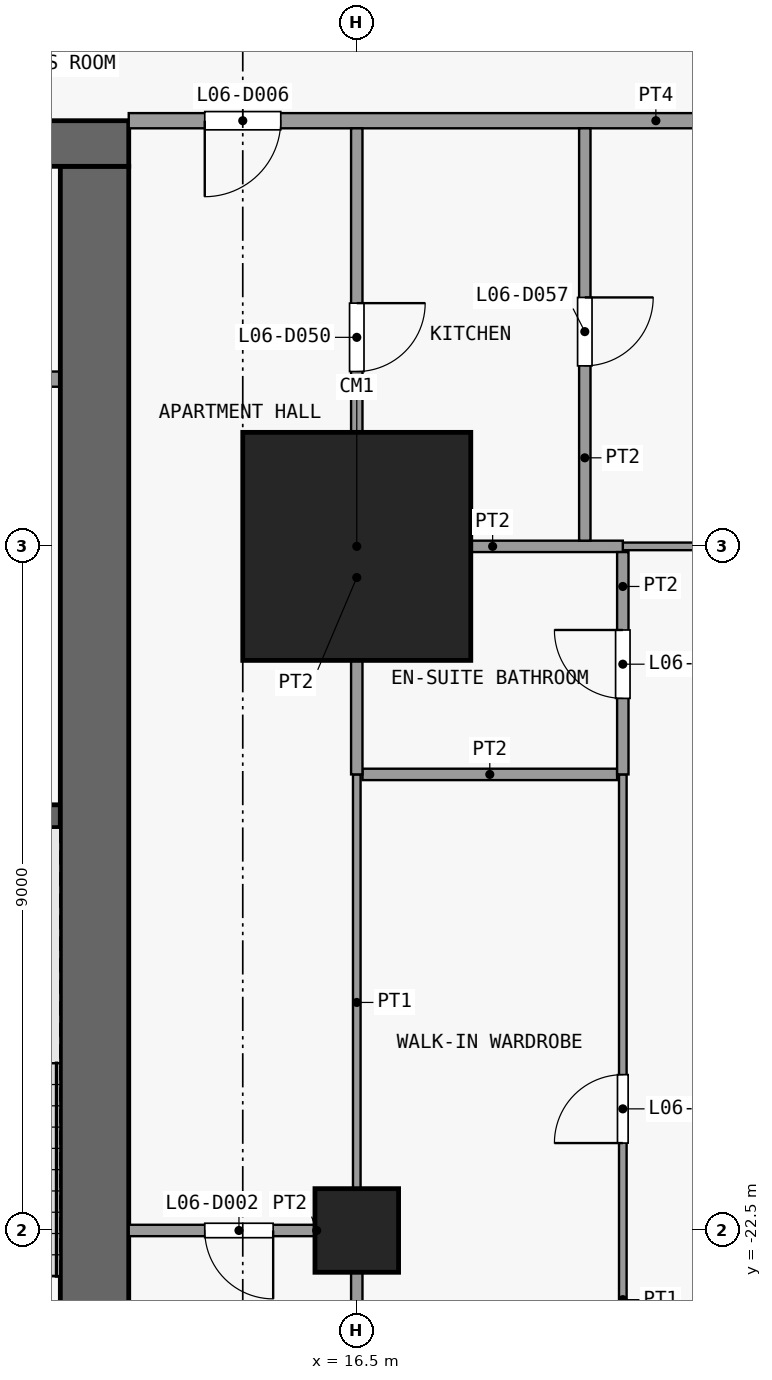
"""IFC4 building model, lengths in metres.
Left out: names, types, materials, properties, quantities, classifications, styles, units other than length and angle.
Written with IfcOpenShell. Run it as: python <this file> out.ifc"""

import sys

from ifc_helpers import new_model, si_unit, direction, frame, frame_2d, origin, origin_2d, place, context, subcontext, project, spatial, rectangle, extrude, element, fill, save


model = new_model("IFC4")
c1 = context("Model", 3, precision=1e-05, world=origin(), true_north=direction((0.0, 1.0)))
c2 = subcontext(c1, "Body", "Model", "MODEL_VIEW")
j1 = project(units=[si_unit("LENGTHUNIT", "METRE"), si_unit("PLANEANGLEUNIT", "RADIAN")], contexts=[c1])
p1 = place(None, origin())
s1 = spatial("IfcSite", under=j1, at=p1, CompositionType="ELEMENT")
p2 = place(p1, origin())
s2 = spatial("IfcBuilding", under=s1, at=p2, CompositionType="ELEMENT")
p3 = place(p2, frame((0.0, 0.0, 32.5)))
s3 = spatial("IfcBuildingStorey", under=s2, at=p3, CompositionType="ELEMENT", Elevation=32.5)
p4 = place(p3, frame((16.5, -22.5, 0.0), z_axis=(0.0, 0.0, 1.0), x_axis=(1.0, 0.0, 0.0)))
e1 = element("IfcColumn", 1, at=p4, inside=s3, PredefinedType="COLUMN", context=c2, shape_type="SweptSolid", body=[
    extrude(rectangle(XDim=1.1, YDim=1.1, at=origin_2d()), origin(), (0.0, 0.0, 1.0), 3.6),
])
p5 = place(p3, frame((16.5, -13.5, 0.0), z_axis=(0.0, 0.0, 1.0), x_axis=(1.0, 0.0, 0.0)))
e2 = element("IfcColumn", 2, at=p5, inside=s3, PredefinedType="COLUMN", context=c2, shape_type="SweptSolid", body=[
    extrude(rectangle(XDim=3.0, YDim=3.0, at=origin_2d()), origin(), (0.0, 0.0, 1.0), 3.6),
])
p6 = place(p3, frame((-13.5, -8.2, 0.0), z_axis=(0.0, 0.0, 1.0), x_axis=(1.0, 0.0, 0.0)))
e3 = element("IfcWall", 3, at=p6, inside=s3, PredefinedType="SHEAR", context=c2, shape_type="SweptSolid", body=[
    extrude(rectangle(XDim=27.0, YDim=0.6, at=frame_2d((13.5, 0.0))), origin(), (0.0, 0.0, 1.0), 3.3),
])
p7 = place(p6, frame((7.8, 0.0, 0.0)))
e4 = element("IfcOpeningElement", 4, at=p7, cuts=e3, PredefinedType="OPENING", context=c2, shape_type="SweptSolid", body=[
    extrude(rectangle(XDim=1.8, YDim=2.1, at=frame_2d((0.9, 1.05))), frame((0.0, 0.31, 0.0), z_axis=(0.0, -1.0, 0.0), x_axis=(1.0, 0.0, 0.0)), (0.0, 0.0, 1.0), 0.62),
])
p8 = place(p6, frame((17.4, 0.0, 0.0)))
e5 = element("IfcOpeningElement", 5, at=p8, cuts=e3, PredefinedType="OPENING", context=c2, shape_type="SweptSolid", body=[
    extrude(rectangle(XDim=1.8, YDim=2.1, at=frame_2d((0.9, 1.05))), frame((0.0, 0.31, 0.0), z_axis=(0.0, -1.0, 0.0), x_axis=(1.0, 0.0, 0.0)), (0.0, 0.0, 1.0), 0.62),
])
p9 = place(p6, frame((2.725, 0.0, 0.0)))
e6 = element("IfcOpeningElement", 6, at=p9, cuts=e3, PredefinedType="OPENING", context=c2, shape_type="SweptSolid", body=[
    extrude(rectangle(XDim=0.9, YDim=2.1, at=frame_2d((0.45, 1.05))), frame((0.0, 0.31, 0.0), z_axis=(0.0, -1.0, 0.0), x_axis=(1.0, 0.0, 0.0)), (0.0, 0.0, 1.0), 0.62),
])
p10 = place(p6, frame((23.375, 0.0, 0.0)))
e7 = element("IfcOpeningElement", 7, at=p10, cuts=e3, PredefinedType="OPENING", context=c2, shape_type="SweptSolid", body=[
    extrude(rectangle(XDim=0.9, YDim=2.1, at=frame_2d((0.45, 1.05))), frame((0.0, 0.31, 0.0), z_axis=(0.0, -1.0, 0.0), x_axis=(1.0, 0.0, 0.0)), (0.0, 0.0, 1.0), 0.62),
])
p11 = place(p3, frame((13.05, -24.6, 0.0), z_axis=(0.0, 0.0, 1.0), x_axis=(0.0, 1.0, 0.0)))
e8 = element("IfcWall", 8, at=p11, inside=s3, PredefinedType="SHEAR", context=c2, shape_type="SweptSolid", body=[
    extrude(rectangle(XDim=16.1, YDim=0.9, at=frame_2d((8.05, 0.0))), origin(), (0.0, 0.0, 1.0), 3.3),
])
p12 = place(p3, frame((9.5, -17.05, 0.0), z_axis=(0.0, 0.0, 1.0), x_axis=(1.0, 0.0, 0.0)))
e9 = element("IfcWall", 9, at=p12, inside=s3, PredefinedType="SHEAR", context=c2, shape_type="SweptSolid", body=[
    extrude(rectangle(XDim=3.1, YDim=0.3, at=frame_2d((1.55, 0.0))), origin(), (0.0, 0.0, 1.0), 3.3),
])
p13 = place(p3, frame((11.15, -11.3, 0.0), z_axis=(0.0, 0.0, 1.0), x_axis=(1.0, 0.0, 0.0)))
e10 = element("IfcWall", 10, at=p13, inside=s3, PredefinedType="PARTITIONING", context=c2, shape_type="SweptSolid", body=[
    extrude(rectangle(XDim=1.45, YDim=0.2, at=frame_2d((0.725, 0.0))), origin(), (0.0, 0.0, 1.0), 3.3),
])
p14 = place(p3, frame((13.5, -22.5, 0.0), z_axis=(0.0, 0.0, 1.0), x_axis=(1.0, 0.0, 0.0)))
e11 = element("IfcWall", 11, at=p14, inside=s3, PredefinedType="PARTITIONING", context=c2, shape_type="SweptSolid", body=[
    extrude(rectangle(XDim=2.925, YDim=0.15, at=frame_2d((1.462, 0.0))), origin(), (0.0, 0.0, 1.0), 3.3),
])
p15 = place(p14, frame((1.0, 0.0, 0.0)))
e12 = element("IfcOpeningElement", 12, at=p15, cuts=e11, PredefinedType="OPENING", context=c2, shape_type="SweptSolid", body=[
    extrude(rectangle(XDim=0.9, YDim=2.1, at=frame_2d((0.45, 1.05))), frame((0.0, 0.085, 0.0), z_axis=(0.0, -1.0, 0.0), x_axis=(1.0, 0.0, 0.0)), (0.0, 0.0, 1.0), 0.17),
])
p16 = place(p3, frame((16.575, -16.5, 0.0), z_axis=(0.0, 0.0, 1.0), x_axis=(1.0, 0.0, 0.0)))
e13 = element("IfcWall", 13, at=p16, inside=s3, PredefinedType="PARTITIONING", context=c2, shape_type="SweptSolid", body=[
    extrude(rectangle(XDim=3.35, YDim=0.15, at=frame_2d((1.675, 0.0))), origin(), (0.0, 0.0, 1.0), 3.3),
])
p17 = place(p3, frame((20.0, -13.5, 0.0), z_axis=(0.0, 0.0, 1.0), x_axis=(1.0, 0.0, 0.0)))
e14 = element("IfcWall", 14, at=p17, inside=s3, PredefinedType="PARTITIONING", context=c2, shape_type="SweptSolid", body=[
    extrude(rectangle(XDim=5.25, YDim=0.1, at=frame_2d((2.625, 0.0))), origin(), (0.0, 0.0, 1.0), 3.3),
])
p18 = place(p17, frame((3.2, 0.0, 0.0)))
e15 = element("IfcOpeningElement", 15, at=p18, cuts=e14, PredefinedType="OPENING", context=c2, shape_type="SweptSolid", body=[
    extrude(rectangle(XDim=0.9, YDim=2.1, at=frame_2d((0.45, 1.05))), frame((0.0, 0.06, 0.0), z_axis=(0.0, -1.0, 0.0), x_axis=(1.0, 0.0, 0.0)), (0.0, 0.0, 1.0), 0.12),
])
p19 = place(p3, frame((16.575, -13.5, 0.0), z_axis=(0.0, 0.0, 1.0), x_axis=(1.0, 0.0, 0.0)))
e16 = element("IfcWall", 16, at=p19, inside=s3, PredefinedType="PARTITIONING", context=c2, shape_type="SweptSolid", body=[
    extrude(rectangle(XDim=3.425, YDim=0.15, at=frame_2d((1.712, 0.0))), origin(), (0.0, 0.0, 1.0), 3.3),
])
p20 = place(p3, frame((13.5, -7.9, 0.0), z_axis=(0.0, 0.0, 1.0), x_axis=(1.0, 0.0, 0.0)))
e17 = element("IfcWall", 17, at=p20, inside=s3, PredefinedType="PARTITIONING", context=c2, shape_type="SweptSolid", body=[
    extrude(rectangle(XDim=11.75, YDim=0.2, at=frame_2d((5.875, 0.0))), origin(), (0.0, 0.0, 1.0), 3.3),
])
p21 = place(p20, frame((1.0, 0.0, 0.0)))
e18 = element("IfcOpeningElement", 18, at=p21, cuts=e17, PredefinedType="OPENING", context=c2, shape_type="SweptSolid", body=[
    extrude(rectangle(XDim=1.0, YDim=2.1, at=frame_2d((0.5, 1.05))), frame((0.0, 0.11, 0.0), z_axis=(0.0, -1.0, 0.0), x_axis=(1.0, 0.0, 0.0)), (0.0, 0.0, 1.0), 0.22),
])
p22 = place(p3, frame((16.5, -22.5, 0.0), z_axis=(0.0, 0.0, 1.0), x_axis=(0.0, 1.0, 0.0)))
e19 = element("IfcWall", 19, at=p22, inside=s3, PredefinedType="PARTITIONING", context=c2, shape_type="SweptSolid", body=[
    extrude(rectangle(XDim=6.0, YDim=0.1, at=frame_2d((3.0, 0.0))), origin(), (0.0, 0.0, 1.0), 3.3),
])
p23 = place(p3, frame((16.5, -25.25, 0.0), z_axis=(0.0, 0.0, 1.0), x_axis=(0.0, 1.0, 0.0)))
e20 = element("IfcWall", 20, at=p23, inside=s3, PredefinedType="PARTITIONING", context=c2, shape_type="SweptSolid", body=[
    extrude(rectangle(XDim=2.75, YDim=0.15, at=frame_2d((1.375, 0.0))), origin(), (0.0, 0.0, 1.0), 3.3),
])
p24 = place(p3, frame((16.5, -16.5, 0.0), z_axis=(0.0, 0.0, 1.0), x_axis=(0.0, 1.0, 0.0)))
e21 = element("IfcWall", 21, at=p24, inside=s3, PredefinedType="PARTITIONING", context=c2, shape_type="SweptSolid", body=[
    extrude(rectangle(XDim=8.5, YDim=0.15, at=frame_2d((4.25, 0.0))), origin(), (0.0, 0.0, 1.0), 3.3),
])
p25 = place(p24, frame((5.3, 0.0, 0.0)))
e22 = element("IfcOpeningElement", 22, at=p25, cuts=e21, PredefinedType="OPENING", context=c2, shape_type="SweptSolid", body=[
    extrude(rectangle(XDim=0.9, YDim=2.1, at=frame_2d((0.45, 1.05))), frame((0.0, 0.085, 0.0), z_axis=(0.0, -1.0, 0.0), x_axis=(1.0, 0.0, 0.0)), (0.0, 0.0, 1.0), 0.17),
])
p26 = place(p3, frame((19.5, -13.425, 0.0), z_axis=(0.0, 0.0, 1.0), x_axis=(0.0, 1.0, 0.0)))
e23 = element("IfcWall", 23, at=p26, inside=s3, PredefinedType="PARTITIONING", context=c2, shape_type="SweptSolid", body=[
    extrude(rectangle(XDim=5.425, YDim=0.15, at=frame_2d((2.712, 0.0))), origin(), (0.0, 0.0, 1.0), 3.3),
])
p27 = place(p26, frame((2.3, 0.0, 0.0)))
e24 = element("IfcOpeningElement", 24, at=p27, cuts=e23, PredefinedType="OPENING", context=c2, shape_type="SweptSolid", body=[
    extrude(rectangle(XDim=0.9, YDim=2.1, at=frame_2d((0.45, 1.05))), frame((0.0, 0.085, 0.0), z_axis=(0.0, -1.0, 0.0), x_axis=(1.0, 0.0, 0.0)), (0.0, 0.0, 1.0), 0.17),
])
p28 = place(p3, frame((20.0, -25.35, 0.0), z_axis=(0.0, 0.0, 1.0), x_axis=(0.0, 1.0, 0.0)))
e25 = element("IfcWall", 25, at=p28, inside=s3, PredefinedType="PARTITIONING", context=c2, shape_type="SweptSolid", body=[
    extrude(rectangle(XDim=8.85, YDim=0.1, at=frame_2d((4.425, 0.0))), origin(), (0.0, 0.0, 1.0), 3.3),
])
p29 = place(p28, frame((4.0, 0.0, 0.0)))
e26 = element("IfcOpeningElement", 26, at=p29, cuts=e25, PredefinedType="OPENING", context=c2, shape_type="SweptSolid", body=[
    extrude(rectangle(XDim=0.9, YDim=2.1, at=frame_2d((0.45, 1.05))), frame((0.0, 0.06, 0.0), z_axis=(0.0, -1.0, 0.0), x_axis=(1.0, 0.0, 0.0)), (0.0, 0.0, 1.0), 0.12),
])
p30 = place(p3, frame((20.0, -16.5, 0.0), z_axis=(0.0, 0.0, 1.0), x_axis=(0.0, 1.0, 0.0)))
e27 = element("IfcWall", 27, at=p30, inside=s3, PredefinedType="PARTITIONING", context=c2, shape_type="SweptSolid", body=[
    extrude(rectangle(XDim=2.925, YDim=0.15, at=frame_2d((1.462, 0.0))), origin(), (0.0, 0.0, 1.0), 3.3),
])
p31 = place(p30, frame((1.0, 0.0, 0.0)))
e28 = element("IfcOpeningElement", 28, at=p31, cuts=e27, PredefinedType="OPENING", context=c2, shape_type="SweptSolid", body=[
    extrude(rectangle(XDim=0.9, YDim=2.1, at=frame_2d((0.45, 1.05))), frame((0.0, 0.085, 0.0), z_axis=(0.0, -1.0, 0.0), x_axis=(1.0, 0.0, 0.0)), (0.0, 0.0, 1.0), 0.17),
])
p32 = place(p15, origin())
e29 = element("IfcDoor", 29, at=p32, inside=s3, OperationType="SINGLE_SWING_RIGHT", PredefinedType="DOOR", context=c2, shape_type="SweptSolid", body=[
    extrude(rectangle(XDim=0.9, YDim=2.1, at=frame_2d((0.45, 1.05))), frame((0.0, 0.025, 0.0), z_axis=(0.0, -1.0, 0.0), x_axis=(1.0, 0.0, 0.0)), (0.0, 0.0, 1.0), 0.05),
])
fill(e12, e29)
p33 = place(p21, origin())
e30 = element("IfcDoor", 30, at=p33, inside=s3, OperationType="SINGLE_SWING_LEFT", PredefinedType="DOOR", context=c2, shape_type="SweptSolid", body=[
    extrude(rectangle(XDim=1.0, YDim=2.1, at=frame_2d((0.5, 1.05))), frame((0.0, 0.025, 0.0), z_axis=(0.0, -1.0, 0.0), x_axis=(1.0, 0.0, 0.0)), (0.0, 0.0, 1.0), 0.05),
])
fill(e18, e30)
p34 = place(p25, origin())
e31 = element("IfcDoor", 31, at=p34, inside=s3, OperationType="SINGLE_SWING_RIGHT", PredefinedType="DOOR", context=c2, shape_type="SweptSolid", body=[
    extrude(rectangle(XDim=0.9, YDim=2.1, at=frame_2d((0.45, 1.05))), frame((0.0, 0.025, 0.0), z_axis=(0.0, -1.0, 0.0), x_axis=(1.0, 0.0, 0.0)), (0.0, 0.0, 1.0), 0.05),
])
fill(e22, e31)
p35 = place(p27, origin())
e32 = element("IfcDoor", 32, at=p35, inside=s3, OperationType="SINGLE_SWING_RIGHT", PredefinedType="DOOR", context=c2, shape_type="SweptSolid", body=[
    extrude(rectangle(XDim=0.9, YDim=2.1, at=frame_2d((0.45, 1.05))), frame((0.0, 0.025, 0.0), z_axis=(0.0, -1.0, 0.0), x_axis=(1.0, 0.0, 0.0)), (0.0, 0.0, 1.0), 0.05),
])
fill(e24, e32)
p36 = place(p29, origin())
e33 = element("IfcDoor", 33, at=p36, inside=s3, OperationType="SINGLE_SWING_RIGHT", PredefinedType="DOOR", context=c2, shape_type="SweptSolid", body=[
    extrude(rectangle(XDim=0.9, YDim=2.1, at=frame_2d((0.45, 1.05))), frame((0.0, 0.025, 0.0), z_axis=(0.0, -1.0, 0.0), x_axis=(1.0, 0.0, 0.0)), (0.0, 0.0, 1.0), 0.05),
])
fill(e26, e33)
p37 = place(p31, origin())
e34 = element("IfcDoor", 34, at=p37, inside=s3, OperationType="SINGLE_SWING_LEFT", PredefinedType="DOOR", context=c2, shape_type="SweptSolid", body=[
    extrude(rectangle(XDim=0.9, YDim=2.1, at=frame_2d((0.45, 1.05))), frame((0.0, 0.025, 0.0), z_axis=(0.0, -1.0, 0.0), x_axis=(1.0, 0.0, 0.0)), (0.0, 0.0, 1.0), 0.05),
])
fill(e28, e34)
save(model, sys.argv[1])
